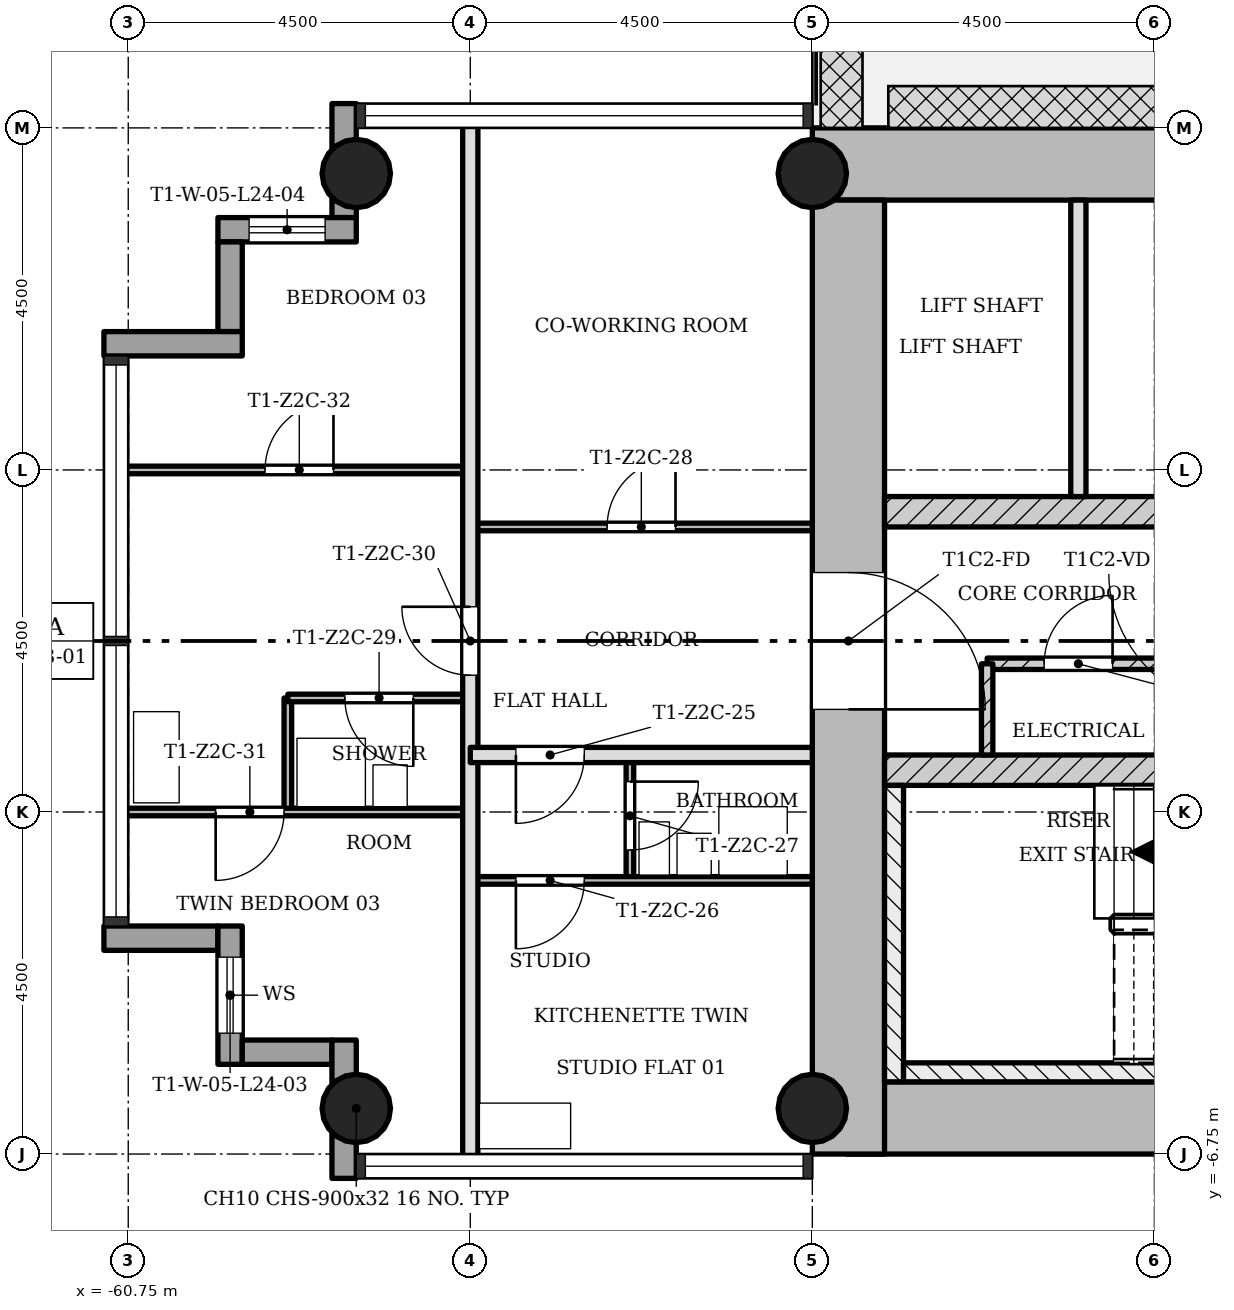
"""IFC4 building model, lengths in metres.
Left out: names, types, materials, properties, quantities, classifications, styles, units other than length and angle.
Written with IfcOpenShell. Run it as: python <this file> out.ifc"""

import sys

from ifc_helpers import new_model, si_unit, direction, frame, frame_2d, origin, origin_2d, place, context, subcontext, project, spatial, rectangle, hollow_circle, extrude, element, fill, save


model = new_model("IFC4")
c1 = context("Model", 3, precision=1e-05, world=origin(), true_north=direction((0.0, 1.0)))
c2 = subcontext(c1, "Body", "Model", "MODEL_VIEW")
j1 = project(units=[si_unit("LENGTHUNIT", "METRE"), si_unit("PLANEANGLEUNIT", "RADIAN")], contexts=[c1])
p1 = place(None, origin())
s1 = spatial("IfcSite", under=j1, at=p1, CompositionType="ELEMENT")
p2 = place(p1, origin())
s2 = spatial("IfcBuilding", under=s1, at=p2, CompositionType="ELEMENT")
p3 = place(p2, frame((0.0, 0.0, 90.2)))
s3 = spatial("IfcBuildingStorey", under=s2, at=p3, CompositionType="ELEMENT", Elevation=90.2)
p4 = place(p3, frame((-51.298, -6.275, 0.0), z_axis=(0.0, 0.0, 1.0), x_axis=(1.0, 0.0, 0.0)))
e1 = element("IfcWall", 1, at=p4, inside=s3, PredefinedType="SHEAR", context=c2, shape_type="SweptSolid", body=[
    extrude(rectangle(XDim=8.696, YDim=0.95, at=frame_2d((4.348, 0.0))), origin(), (0.0, 0.0, 1.0), 3.4),
])
p5 = place(p3, frame((-43.7, 6.275, 0.0), z_axis=(0.0, 0.0, 1.0), x_axis=(-1.0, 0.0, 0.0)))
e2 = element("IfcWall", 2, at=p5, inside=s3, PredefinedType="SHEAR", context=c2, shape_type="SweptSolid", body=[
    extrude(rectangle(XDim=8.05, YDim=0.95, at=frame_2d((4.025, 0.0))), origin(), (0.0, 0.0, 1.0), 3.4),
])
p6 = place(p3, frame((-51.275, 5.8, 0.0), z_axis=(0.0, 0.0, 1.0), x_axis=(0.0, -1.0, 0.0)))
e3 = element("IfcWall", 3, at=p6, inside=s3, PredefinedType="SHEAR", context=c2, shape_type="SweptSolid", body=[
    extrude(rectangle(XDim=12.55, YDim=0.95, at=frame_2d((6.275, 0.0))), origin(), (0.0, 0.0, 1.0), 3.4),
])
p7 = place(p6, frame((4.9, 0.0, 0.0)))
e4 = element("IfcOpeningElement", 4, at=p7, cuts=e3, PredefinedType="OPENING", context=c2, shape_type="SweptSolid", body=[
    extrude(rectangle(XDim=1.8, YDim=2.1, at=frame_2d((0.9, 1.05))), frame((0.0, 0.485, 0.0), z_axis=(0.0, -1.0, 0.0), x_axis=(1.0, 0.0, 0.0)), (0.0, 0.0, 1.0), 0.97),
])
p8 = place(p3, frame((-50.8, -1.7, 0.0), z_axis=(0.0, 0.0, 1.0), x_axis=(1.0, 0.0, 0.0)))
e5 = element("IfcWall", 5, at=p8, inside=s3, PredefinedType="SHEAR", context=c2, shape_type="SweptSolid", body=[
    extrude(rectangle(XDim=7.1, YDim=0.4, at=frame_2d((3.55, 0.0))), origin(), (0.0, 0.0, 1.0), 3.4),
])
p9 = place(p8, frame((5.5, 0.0, 0.0)))
e6 = element("IfcOpeningElement", 6, at=p9, cuts=e5, PredefinedType="OPENING", context=c2, shape_type="SweptSolid", body=[
    extrude(rectangle(XDim=0.9, YDim=2.1, at=frame_2d((0.45, 1.05))), frame((0.0, 0.21, 0.0), z_axis=(0.0, -1.0, 0.0), x_axis=(1.0, 0.0, 0.0)), (0.0, 0.0, 1.0), 0.42),
])
p10 = place(p3, frame((-50.8, 1.7, 0.0), z_axis=(0.0, 0.0, 1.0), x_axis=(1.0, 0.0, 0.0)))
e7 = element("IfcWall", 7, at=p10, inside=s3, PredefinedType="SHEAR", context=c2, shape_type="SweptSolid", body=[
    extrude(rectangle(XDim=7.1, YDim=0.4, at=frame_2d((3.55, 0.0))), origin(), (0.0, 0.0, 1.0), 3.4),
])
p11 = place(p10, frame((5.2, 0.0, 0.0)))
e8 = element("IfcOpeningElement", 8, at=p11, cuts=e7, PredefinedType="OPENING", context=c2, shape_type="SweptSolid", body=[
    extrude(rectangle(XDim=1.1, YDim=2.1, at=frame_2d((0.55, 1.05))), frame((0.0, 0.21, 0.0), z_axis=(0.0, -1.0, 0.0), x_axis=(1.0, 0.0, 0.0)), (0.0, 0.0, 1.0), 0.42),
])
for number, where, z_axis, x_axis in (
    (9, (-51.75, -6.15, 0.0), (0.0, 0.0, 1.0), (1.0, 0.0, 0.0)),
    (10, (-51.75, 6.15, 0.0), (0.0, 0.0, 1.0), (1.0, 0.0, 0.0)),
    (11, (-57.75, -6.15, 0.0), (0.0, 0.0, 1.0), (1.0, 0.0, 0.0)),
    (12, (-57.75, 6.15, 0.0), (0.0, 0.0, 1.0), (1.0, 0.0, 0.0)),
):
    element("IfcColumn", number, at=place(p3, frame(where, z_axis=z_axis, x_axis=x_axis)), inside=s3, PredefinedType="COLUMN", context=c2, shape_type="SweptSolid", body=[
        extrude(hollow_circle(Radius=0.45, WallThickness=0.032, at=origin_2d()), origin(), (0.0, 0.0, 1.0), 3.4),
    ])
p12 = place(p3, frame((-61.07, -3.91, -0.3), z_axis=(0.0, 0.0, 1.0), x_axis=(1.0, 0.0, 0.0)))
e13 = element("IfcWall", 13, at=p12, inside=s3, PredefinedType="STANDARD", context=c2, shape_type="SweptSolid", body=[
    extrude(rectangle(XDim=1.5, YDim=0.32, at=frame_2d((0.75, 0.0))), origin(), (0.0, 0.0, 1.0), 3.4),
])
p13 = place(p3, frame((-59.41, -3.75, -0.3), z_axis=(0.0, 0.0, 1.0), x_axis=(0.0, -1.0, 0.0)))
e14 = element("IfcWall", 14, at=p13, inside=s3, PredefinedType="STANDARD", context=c2, shape_type="SweptSolid", body=[
    extrude(rectangle(XDim=1.82, YDim=0.32, at=frame_2d((0.91, 0.0))), origin(), (0.0, 0.0, 1.0), 3.4),
])
p14 = place(p13, frame((0.41, 0.0, 1.2)))
e15 = element("IfcOpeningElement", 15, at=p14, cuts=e14, PredefinedType="OPENING", context=c2, shape_type="SweptSolid", body=[
    extrude(rectangle(XDim=1.0, YDim=1.5, at=frame_2d((0.5, 0.75))), frame((0.0, 0.17, 0.0), z_axis=(0.0, -1.0, 0.0), x_axis=(1.0, 0.0, 0.0)), (0.0, 0.0, 1.0), 0.34),
])
p15 = place(p3, frame((-59.25, -5.41, -0.3), z_axis=(0.0, 0.0, 1.0), x_axis=(1.0, 0.0, 0.0)))
e16 = element("IfcWall", 16, at=p15, inside=s3, PredefinedType="STANDARD", context=c2, shape_type="SweptSolid", body=[
    extrude(rectangle(XDim=1.18, YDim=0.32, at=frame_2d((0.59, 0.0))), origin(), (0.0, 0.0, 1.0), 3.4),
])
p16 = place(p3, frame((-57.91, -5.25, -0.3), z_axis=(0.0, 0.0, 1.0), x_axis=(0.0, -1.0, 0.0)))
e17 = element("IfcWall", 17, at=p16, inside=s3, PredefinedType="STANDARD", context=c2, shape_type="SweptSolid", body=[
    extrude(rectangle(XDim=1.82, YDim=0.32, at=frame_2d((0.91, 0.0))), origin(), (0.0, 0.0, 1.0), 3.4),
])
p17 = place(p3, frame((-57.91, 7.07, -0.3), z_axis=(0.0, 0.0, 1.0), x_axis=(0.0, -1.0, 0.0)))
e18 = element("IfcWall", 18, at=p17, inside=s3, PredefinedType="STANDARD", context=c2, shape_type="SweptSolid", body=[
    extrude(rectangle(XDim=1.5, YDim=0.32, at=frame_2d((0.75, 0.0))), origin(), (0.0, 0.0, 1.0), 3.4),
])
p18 = place(p3, frame((-57.75, 5.41, -0.3), z_axis=(0.0, 0.0, 1.0), x_axis=(-1.0, 0.0, 0.0)))
e19 = element("IfcWall", 19, at=p18, inside=s3, PredefinedType="STANDARD", context=c2, shape_type="SweptSolid", body=[
    extrude(rectangle(XDim=1.82, YDim=0.32, at=frame_2d((0.91, 0.0))), origin(), (0.0, 0.0, 1.0), 3.4),
])
p19 = place(p18, frame((0.41, 0.0, 1.2)))
e20 = element("IfcOpeningElement", 20, at=p19, cuts=e19, PredefinedType="OPENING", context=c2, shape_type="SweptSolid", body=[
    extrude(rectangle(XDim=1.0, YDim=1.5, at=frame_2d((0.5, 0.75))), frame((0.0, 0.17, 0.0), z_axis=(0.0, -1.0, 0.0), x_axis=(1.0, 0.0, 0.0)), (0.0, 0.0, 1.0), 0.34),
])
p20 = place(p3, frame((-59.41, 5.25, -0.3), z_axis=(0.0, 0.0, 1.0), x_axis=(0.0, -1.0, 0.0)))
e21 = element("IfcWall", 21, at=p20, inside=s3, PredefinedType="STANDARD", context=c2, shape_type="SweptSolid", body=[
    extrude(rectangle(XDim=1.18, YDim=0.32, at=frame_2d((0.59, 0.0))), origin(), (0.0, 0.0, 1.0), 3.4),
])
p21 = place(p3, frame((-59.25, 3.91, -0.3), z_axis=(0.0, 0.0, 1.0), x_axis=(-1.0, 0.0, 0.0)))
e22 = element("IfcWall", 22, at=p21, inside=s3, PredefinedType="STANDARD", context=c2, shape_type="SweptSolid", body=[
    extrude(rectangle(XDim=1.82, YDim=0.32, at=frame_2d((0.91, 0.0))), origin(), (0.0, 0.0, 1.0), 3.4),
])
p22 = place(p3, frame((-48.25, 5.8, 0.0), z_axis=(0.0, 0.0, 1.0), x_axis=(0.0, -1.0, 0.0)))
e23 = element("IfcWall", 23, at=p22, inside=s3, PredefinedType="SOLIDWALL", context=c2, shape_type="SweptSolid", body=[
    extrude(rectangle(XDim=3.9, YDim=0.2, at=frame_2d((1.95, 0.0))), origin(), (0.0, 0.0, 1.0), 3.0),
])
p23 = place(p3, frame((-47.05, -0.3, 0.0), z_axis=(0.0, 0.0, 1.0), x_axis=(-1.0, 0.0, 0.0)))
e24 = element("IfcWall", 24, at=p23, inside=s3, PredefinedType="PARTITIONING", context=c2, shape_type="SweptSolid", body=[
    extrude(rectangle(XDim=2.4, YDim=0.15, at=frame_2d((1.2, 0.0))), origin(), (0.0, 0.0, 1.0), 3.0),
])
p24 = place(p23, frame((0.75, 0.0, 0.0)))
e25 = element("IfcOpeningElement", 25, at=p24, cuts=e24, PredefinedType="OPENING", context=c2, shape_type="SweptSolid", body=[
    extrude(rectangle(XDim=0.9, YDim=2.1, at=frame_2d((0.45, 1.05))), frame((0.0, 0.085, 0.0), z_axis=(0.0, -1.0, 0.0), x_axis=(1.0, 0.0, 0.0)), (0.0, 0.0, 1.0), 0.17),
])
p25 = place(p3, frame((-49.45, -0.3, 0.0), z_axis=(0.0, 0.0, 1.0), x_axis=(0.0, -1.0, 0.0)))
e26 = element("IfcWall", 26, at=p25, inside=s3, PredefinedType="PARTITIONING", context=c2, shape_type="SweptSolid", body=[
    extrude(rectangle(XDim=1.2, YDim=0.15, at=frame_2d((0.6, 0.0))), origin(), (0.0, 0.0, 1.0), 3.0),
])
p26 = place(p3, frame((-58.65, -2.25, 0.0), z_axis=(0.0, 0.0, 1.0), x_axis=(0.0, 1.0, 0.0)))
e27 = element("IfcWall", 27, at=p26, inside=s3, PredefinedType="PARTITIONING", context=c2, shape_type="SweptSolid", body=[
    extrude(rectangle(XDim=1.5, YDim=0.1, at=frame_2d((0.75, 0.0))), origin(), (0.0, 0.0, 1.0), 3.0),
])
p27 = place(p3, frame((-56.25, -6.85, 0.0), z_axis=(0.0, 0.0, 1.0), x_axis=(0.0, 1.0, 0.0)))
e28 = element("IfcWall", 28, at=p27, inside=s3, PredefinedType="SOLIDWALL", context=c2, shape_type="SweptSolid", body=[
    extrude(rectangle(XDim=13.7, YDim=0.2, at=frame_2d((6.85, 0.0))), origin(), (0.0, 0.0, 1.0), 3.0),
])
p28 = place(p27, frame((6.4, 0.0, 0.0)))
e29 = element("IfcOpeningElement", 29, at=p28, cuts=e28, PredefinedType="OPENING", context=c2, shape_type="SweptSolid", body=[
    extrude(rectangle(XDim=0.9, YDim=2.1, at=frame_2d((0.45, 1.05))), frame((0.0, 0.11, 0.0), z_axis=(0.0, -1.0, 0.0), x_axis=(1.0, 0.0, 0.0)), (0.0, 0.0, 1.0), 0.22),
])
p29 = place(p3, frame((-54.15, -3.15, 0.0), z_axis=(0.0, 0.0, 1.0), x_axis=(0.0, 1.0, 0.0)))
e30 = element("IfcWall", 30, at=p29, inside=s3, PredefinedType="PARTITIONING", context=c2, shape_type="SweptSolid", body=[
    extrude(rectangle(XDim=1.65, YDim=0.1, at=frame_2d((0.825, 0.0))), origin(), (0.0, 0.0, 1.0), 3.0),
])
p30 = place(p29, frame((0.4, 0.0, 0.0)))
e31 = element("IfcOpeningElement", 31, at=p30, cuts=e30, PredefinedType="OPENING", context=c2, shape_type="SweptSolid", body=[
    extrude(rectangle(XDim=0.9, YDim=2.1, at=frame_2d((0.45, 1.05))), frame((0.0, 0.06, 0.0), z_axis=(0.0, -1.0, 0.0), x_axis=(1.0, 0.0, 0.0)), (0.0, 0.0, 1.0), 0.12),
])
p31 = place(p3, frame((-56.25, -3.15, 0.0), z_axis=(0.0, 0.0, 1.0), x_axis=(1.0, 0.0, 0.0)))
e32 = element("IfcWall", 32, at=p31, inside=s3, PredefinedType="PARTITIONING", context=c2, shape_type="SweptSolid", body=[
    extrude(rectangle(XDim=4.5, YDim=0.1, at=frame_2d((2.25, 0.0))), origin(), (0.0, 0.0, 1.0), 3.0),
])
p32 = place(p31, frame((0.6, 0.0, 0.0)))
e33 = element("IfcOpeningElement", 33, at=p32, cuts=e32, PredefinedType="OPENING", context=c2, shape_type="SweptSolid", body=[
    extrude(rectangle(XDim=0.9, YDim=2.1, at=frame_2d((0.45, 1.05))), frame((0.0, 0.06, 0.0), z_axis=(0.0, -1.0, 0.0), x_axis=(1.0, 0.0, 0.0)), (0.0, 0.0, 1.0), 0.12),
])
p33 = place(p3, frame((-60.85, -2.25, 0.0), z_axis=(0.0, 0.0, 1.0), x_axis=(1.0, 0.0, 0.0)))
e34 = element("IfcWall", 34, at=p33, inside=s3, PredefinedType="PARTITIONING", context=c2, shape_type="SweptSolid", body=[
    extrude(rectangle(XDim=4.6, YDim=0.1, at=frame_2d((2.3, 0.0))), origin(), (0.0, 0.0, 1.0), 3.0),
])
p34 = place(p33, frame((1.25, 0.0, 0.0)))
e35 = element("IfcOpeningElement", 35, at=p34, cuts=e34, PredefinedType="OPENING", context=c2, shape_type="SweptSolid", body=[
    extrude(rectangle(XDim=0.9, YDim=2.1, at=frame_2d((0.45, 1.05))), frame((0.0, 0.06, 0.0), z_axis=(0.0, -1.0, 0.0), x_axis=(1.0, 0.0, 0.0)), (0.0, 0.0, 1.0), 0.12),
])
p35 = place(p3, frame((-56.25, -1.5, 0.0), z_axis=(0.0, 0.0, 1.0), x_axis=(1.0, 0.0, 0.0)))
e36 = element("IfcWall", 36, at=p35, inside=s3, PredefinedType="SOLIDWALL", context=c2, shape_type="SweptSolid", body=[
    extrude(rectangle(XDim=4.5, YDim=0.2, at=frame_2d((2.25, 0.0))), origin(), (0.0, 0.0, 1.0), 3.0),
])
p36 = place(p35, frame((0.6, 0.0, 0.0)))
e37 = element("IfcOpeningElement", 37, at=p36, cuts=e36, PredefinedType="OPENING", context=c2, shape_type="SweptSolid", body=[
    extrude(rectangle(XDim=0.9, YDim=2.1, at=frame_2d((0.45, 1.05))), frame((0.0, 0.11, 0.0), z_axis=(0.0, -1.0, 0.0), x_axis=(1.0, 0.0, 0.0)), (0.0, 0.0, 1.0), 0.22),
])
p37 = place(p3, frame((-58.65, -0.75, 0.0), z_axis=(0.0, 0.0, 1.0), x_axis=(1.0, 0.0, 0.0)))
e38 = element("IfcWall", 38, at=p37, inside=s3, PredefinedType="PARTITIONING", context=c2, shape_type="SweptSolid", body=[
    extrude(rectangle(XDim=2.4, YDim=0.1, at=frame_2d((1.2, 0.0))), origin(), (0.0, 0.0, 1.0), 3.0),
])
p38 = place(p37, frame((0.75, 0.0, 0.0)))
e39 = element("IfcOpeningElement", 39, at=p38, cuts=e38, PredefinedType="OPENING", context=c2, shape_type="SweptSolid", body=[
    extrude(rectangle(XDim=0.9, YDim=2.1, at=frame_2d((0.45, 1.05))), frame((0.0, 0.06, 0.0), z_axis=(0.0, -1.0, 0.0), x_axis=(1.0, 0.0, 0.0)), (0.0, 0.0, 1.0), 0.12),
])
p39 = place(p3, frame((-56.25, 1.5, 0.0), z_axis=(0.0, 0.0, 1.0), x_axis=(1.0, 0.0, 0.0)))
e40 = element("IfcWall", 40, at=p39, inside=s3, PredefinedType="PARTITIONING", context=c2, shape_type="SweptSolid", body=[
    extrude(rectangle(XDim=4.5, YDim=0.1, at=frame_2d((2.25, 0.0))), origin(), (0.0, 0.0, 1.0), 3.0),
])
p40 = place(p39, frame((1.8, 0.0, 0.0)))
e41 = element("IfcOpeningElement", 41, at=p40, cuts=e40, PredefinedType="OPENING", context=c2, shape_type="SweptSolid", body=[
    extrude(rectangle(XDim=0.9, YDim=2.1, at=frame_2d((0.45, 1.05))), frame((0.0, 0.06, 0.0), z_axis=(0.0, -1.0, 0.0), x_axis=(1.0, 0.0, 0.0)), (0.0, 0.0, 1.0), 0.12),
])
p41 = place(p3, frame((-60.85, 2.25, 0.0), z_axis=(0.0, 0.0, 1.0), x_axis=(1.0, 0.0, 0.0)))
e42 = element("IfcWall", 42, at=p41, inside=s3, PredefinedType="PARTITIONING", context=c2, shape_type="SweptSolid", body=[
    extrude(rectangle(XDim=4.6, YDim=0.1, at=frame_2d((2.3, 0.0))), origin(), (0.0, 0.0, 1.0), 3.0),
])
p42 = place(p41, frame((1.9, 0.0, 0.0)))
e43 = element("IfcOpeningElement", 43, at=p42, cuts=e42, PredefinedType="OPENING", context=c2, shape_type="SweptSolid", body=[
    extrude(rectangle(XDim=0.9, YDim=2.1, at=frame_2d((0.45, 1.05))), frame((0.0, 0.06, 0.0), z_axis=(0.0, -1.0, 0.0), x_axis=(1.0, 0.0, 0.0)), (0.0, 0.0, 1.0), 0.12),
])
p43 = place(p3, frame((-50.675, -1.9, 0.0), z_axis=(0.0, 0.0, 1.0), x_axis=(0.0, -1.0, 0.0)))
e44 = element("IfcWall", 44, at=p43, inside=s3, PredefinedType="SHEAR", context=c2, shape_type="SweptSolid", body=[
    extrude(rectangle(XDim=3.9, YDim=0.25, at=frame_2d((1.95, 0.0))), origin(), (0.0, 0.0, 1.0), 3.4),
])
p44 = place(p3, frame((-43.95, -5.675, 0.0), z_axis=(0.0, 0.0, 1.0), x_axis=(-1.0, 0.0, 0.0)))
e45 = element("IfcWall", 45, at=p44, inside=s3, PredefinedType="SHEAR", context=c2, shape_type="SweptSolid", body=[
    extrude(rectangle(XDim=6.6, YDim=0.25, at=frame_2d((3.3, 0.0))), origin(), (0.0, 0.0, 1.0), 3.4),
])
p45 = place(p24, origin())
e46 = element("IfcDoor", 46, at=p45, inside=s3, OperationType="SINGLE_SWING_LEFT", PredefinedType="DOOR", context=c2, shape_type="SweptSolid", body=[
    extrude(rectangle(XDim=0.9, YDim=2.1, at=frame_2d((0.45, 1.05))), frame((0.0, 0.025, 0.0), z_axis=(0.0, -1.0, 0.0), x_axis=(1.0, 0.0, 0.0)), (0.0, 0.0, 1.0), 0.05),
])
fill(e25, e46)
p46 = place(p36, origin())
e47 = element("IfcDoor", 47, at=p46, inside=s3, OperationType="SINGLE_SWING_LEFT", PredefinedType="DOOR", context=c2, shape_type="SweptSolid", body=[
    extrude(rectangle(XDim=0.9, YDim=2.1, at=frame_2d((0.45, 1.05))), frame((0.0, 0.025, 0.0), z_axis=(0.0, -1.0, 0.0), x_axis=(1.0, 0.0, 0.0)), (0.0, 0.0, 1.0), 0.05),
])
fill(e37, e47)
p47 = place(p32, origin())
e48 = element("IfcDoor", 48, at=p47, inside=s3, OperationType="SINGLE_SWING_LEFT", PredefinedType="DOOR", context=c2, shape_type="SweptSolid", body=[
    extrude(rectangle(XDim=0.9, YDim=2.1, at=frame_2d((0.45, 1.05))), frame((0.0, 0.025, 0.0), z_axis=(0.0, -1.0, 0.0), x_axis=(1.0, 0.0, 0.0)), (0.0, 0.0, 1.0), 0.05),
])
fill(e33, e48)
p48 = place(p30, origin())
e49 = element("IfcDoor", 49, at=p48, inside=s3, OperationType="SINGLE_SWING_RIGHT", PredefinedType="DOOR", context=c2, shape_type="SweptSolid", body=[
    extrude(rectangle(XDim=0.9, YDim=2.1, at=frame_2d((0.45, 1.05))), frame((0.0, 0.025, 0.0), z_axis=(0.0, -1.0, 0.0), x_axis=(1.0, 0.0, 0.0)), (0.0, 0.0, 1.0), 0.05),
])
fill(e31, e49)
p49 = place(p40, origin())
e50 = element("IfcDoor", 50, at=p49, inside=s3, OperationType="SINGLE_SWING_LEFT", PredefinedType="DOOR", context=c2, shape_type="SweptSolid", body=[
    extrude(rectangle(XDim=0.9, YDim=2.1, at=frame_2d((0.45, 1.05))), frame((0.0, 0.025, 0.0), z_axis=(0.0, -1.0, 0.0), x_axis=(1.0, 0.0, 0.0)), (0.0, 0.0, 1.0), 0.05),
])
fill(e41, e50)
p50 = place(p38, origin())
e51 = element("IfcDoor", 51, at=p50, inside=s3, OperationType="SINGLE_SWING_RIGHT", PredefinedType="DOOR", context=c2, shape_type="SweptSolid", body=[
    extrude(rectangle(XDim=0.9, YDim=2.1, at=frame_2d((0.45, 1.05))), frame((0.0, 0.025, 0.0), z_axis=(0.0, -1.0, 0.0), x_axis=(1.0, 0.0, 0.0)), (0.0, 0.0, 1.0), 0.05),
])
fill(e39, e51)
p51 = place(p28, origin())
e52 = element("IfcDoor", 52, at=p51, inside=s3, OperationType="SINGLE_SWING_LEFT", PredefinedType="DOOR", context=c2, shape_type="SweptSolid", body=[
    extrude(rectangle(XDim=0.9, YDim=2.1, at=frame_2d((0.45, 1.05))), frame((0.0, 0.025, 0.0), z_axis=(0.0, -1.0, 0.0), x_axis=(1.0, 0.0, 0.0)), (0.0, 0.0, 1.0), 0.05),
])
fill(e29, e52)
p52 = place(p34, origin())
e53 = element("IfcDoor", 53, at=p52, inside=s3, OperationType="SINGLE_SWING_LEFT", PredefinedType="DOOR", context=c2, shape_type="SweptSolid", body=[
    extrude(rectangle(XDim=0.9, YDim=2.1, at=frame_2d((0.45, 1.05))), frame((0.0, 0.025, 0.0), z_axis=(0.0, -1.0, 0.0), x_axis=(1.0, 0.0, 0.0)), (0.0, 0.0, 1.0), 0.05),
])
fill(e35, e53)
p53 = place(p42, origin())
e54 = element("IfcDoor", 54, at=p53, inside=s3, OperationType="SINGLE_SWING_LEFT", PredefinedType="DOOR", context=c2, shape_type="SweptSolid", body=[
    extrude(rectangle(XDim=0.9, YDim=2.1, at=frame_2d((0.45, 1.05))), frame((0.0, 0.025, 0.0), z_axis=(0.0, -1.0, 0.0), x_axis=(1.0, 0.0, 0.0)), (0.0, 0.0, 1.0), 0.05),
])
fill(e43, e54)
p54 = place(p7, origin())
e55 = element("IfcDoor", 55, at=p54, inside=s3, OperationType="SINGLE_SWING_LEFT", PredefinedType="DOOR", context=c2, shape_type="SweptSolid", body=[
    extrude(rectangle(XDim=1.8, YDim=2.1, at=frame_2d((0.9, 1.05))), frame((0.0, 0.025, 0.0), z_axis=(0.0, -1.0, 0.0), x_axis=(1.0, 0.0, 0.0)), (0.0, 0.0, 1.0), 0.05),
])
fill(e4, e55)
p55 = place(p14, origin())
e56 = element("IfcWindow", 56, at=p55, inside=s3, PartitioningType="SINGLE_PANEL", PredefinedType="WINDOW", context=c2, shape_type="SweptSolid", body=[
    extrude(rectangle(XDim=1.0, YDim=1.5, at=frame_2d((0.5, 0.75))), frame((0.0, 0.03, 0.0), z_axis=(0.0, -1.0, 0.0), x_axis=(1.0, 0.0, 0.0)), (0.0, 0.0, 1.0), 0.06),
])
fill(e15, e56)
p56 = place(p19, origin())
e57 = element("IfcWindow", 57, at=p56, inside=s3, PartitioningType="SINGLE_PANEL", PredefinedType="WINDOW", context=c2, shape_type="SweptSolid", body=[
    extrude(rectangle(XDim=1.0, YDim=1.5, at=frame_2d((0.5, 0.75))), frame((0.0, 0.03, 0.0), z_axis=(0.0, -1.0, 0.0), x_axis=(1.0, 0.0, 0.0)), (0.0, 0.0, 1.0), 0.06),
])
fill(e20, e57)
save(model, sys.argv[1])
